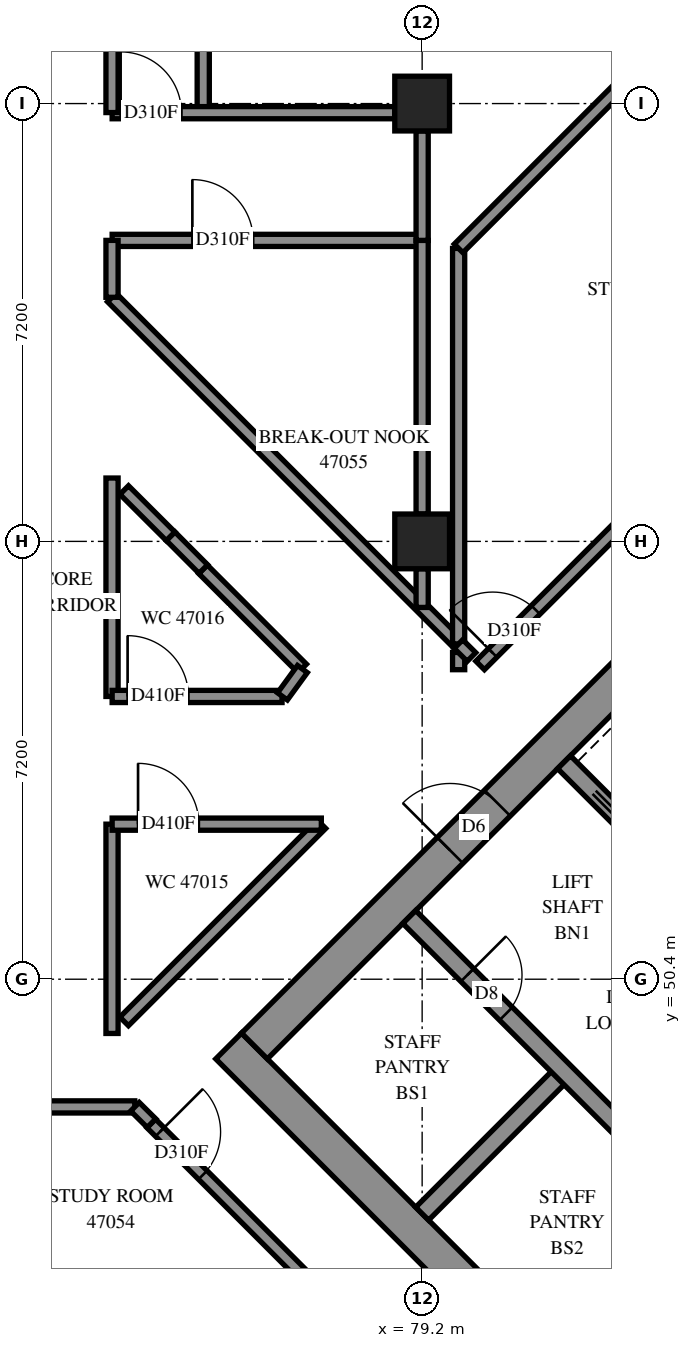
"""IFC4 building model, lengths in metres.
Left out: names, types, materials, properties, quantities, classifications, styles, units other than length and angle.
Written with IfcOpenShell. Run it as: python <this file> out.ifc"""

import sys

from ifc_helpers import new_model, si_unit, direction, frame, frame_2d, origin, origin_2d, place, context, subcontext, project, spatial, rectangle, extrude, element, fill, save


model = new_model("IFC4")
c1 = context("Model", 3, precision=1e-05, world=origin(), true_north=direction((0.0, 1.0)))
c2 = subcontext(c1, "Body", "Model", "MODEL_VIEW")
j1 = project(units=[si_unit("LENGTHUNIT", "METRE"), si_unit("PLANEANGLEUNIT", "RADIAN")], contexts=[c1])
p1 = place(None, origin())
s1 = spatial("IfcSite", under=j1, at=p1, CompositionType="ELEMENT")
p2 = place(p1, origin())
s2 = spatial("IfcBuilding", under=s1, at=p2, CompositionType="ELEMENT")
p3 = place(p2, frame((0.0, 0.0, 172.8)))
s3 = spatial("IfcBuildingStorey", under=s2, at=p3, CompositionType="ELEMENT", Elevation=172.8)
for number, where, z_axis, x_axis in (
    (1, (79.2, 57.6, 0.0), (0.0, 0.0, 1.0), (1.0, 0.0, 0.0)),
    (2, (79.2, 64.8, 0.0), (0.0, 0.0, 1.0), (1.0, 0.0, 0.0)),
):
    element("IfcColumn", number, at=place(p3, frame(where, z_axis=z_axis, x_axis=x_axis)), inside=s3, PredefinedType="COLUMN", context=c2, shape_type="SweptSolid", body=[
        extrude(rectangle(XDim=0.9, YDim=0.9, at=origin_2d()), origin(), (0.0, 0.0, 1.0), 3.1),
    ])
p4 = place(p3, frame((76.018, 49.302, -0.3), z_axis=(0.0, 0.0, 1.0), x_axis=(0.7071067812, -0.7071067812, 0.0)))
e3 = element("IfcWall", 3, at=p4, inside=s3, PredefinedType="SHEAR", context=c2, shape_type="SweptSolid", body=[
    extrude(rectangle(XDim=15.6, YDim=0.6, at=frame_2d((7.8, 0.0))), origin(), (0.0, 0.0, 1.0), 2.7),
])
p5 = place(p3, frame((76.442, 49.302, -0.3), z_axis=(0.0, 0.0, 1.0), x_axis=(0.7071067812, 0.7071067812, 0.0)))
e4 = element("IfcWall", 4, at=p5, inside=s3, PredefinedType="SHEAR", context=c2, shape_type="SweptSolid", body=[
    extrude(rectangle(XDim=14.4, YDim=0.6, at=frame_2d((7.2, 0.0))), origin(), (0.0, 0.0, 1.0), 2.7),
])
p6 = place(p5, frame((4.55, 0.0, 0.3)))
e5 = element("IfcOpeningElement", 5, at=p6, cuts=e4, PredefinedType="OPENING", context=c2, shape_type="SweptSolid", body=[
    extrude(rectangle(XDim=1.1, YDim=2.1, at=frame_2d((0.55, 1.05))), frame((0.0, 0.31, 0.0), z_axis=(0.0, -1.0, 0.0), x_axis=(1.0, 0.0, 0.0)), (0.0, 0.0, 1.0), 0.62),
])
p7 = place(p5, frame((11.35, 0.0, 0.3)))
e6 = element("IfcOpeningElement", 6, at=p7, cuts=e4, PredefinedType="OPENING", context=c2, shape_type="SweptSolid", body=[
    extrude(rectangle(XDim=1.1, YDim=2.1, at=frame_2d((0.55, 1.05))), frame((0.0, 0.31, 0.0), z_axis=(0.0, -1.0, 0.0), x_axis=(1.0, 0.0, 0.0)), (0.0, 0.0, 1.0), 0.62),
])
p8 = place(p3, frame((79.2, 46.544, 0.0), z_axis=(0.0, 0.0, 1.0), x_axis=(0.7071219326, 0.7070916295, 0.0)))
e7 = element("IfcWall", 7, at=p8, inside=s3, PredefinedType="SOLIDWALL", context=c2, shape_type="SweptSolid", body=[
    extrude(rectangle(XDim=3.3, YDim=0.3, at=frame_2d((1.65, 0.0))), origin(), (0.0, 0.0, 1.0), 3.1),
])
p9 = place(p3, frame((81.746, 43.999, 0.0), z_axis=(0.0, 0.0, 1.0), x_axis=(0.7071067812, 0.7071067812, 0.0)))
e8 = element("IfcWall", 8, at=p9, inside=s3, PredefinedType="SOLIDWALL", context=c2, shape_type="SweptSolid", body=[
    extrude(rectangle(XDim=3.3, YDim=0.3, at=frame_2d((1.65, 0.0))), origin(), (0.0, 0.0, 1.0), 3.1),
])
p10 = place(p3, frame((78.988, 51.423, 0.0), z_axis=(0.0, 0.0, 1.0), x_axis=(0.7071067812, -0.7071067812, 0.0)))
e9 = element("IfcWall", 9, at=p10, inside=s3, PredefinedType="SOLIDWALL", context=c2, shape_type="SweptSolid", body=[
    extrude(rectangle(XDim=14.4, YDim=0.3, at=frame_2d((7.2, 0.0))), origin(), (0.0, 0.0, 1.0), 3.1),
])
p11 = place(p10, frame((1.35, 0.0, 0.0)))
e10 = element("IfcOpeningElement", 10, at=p11, cuts=e9, PredefinedType="OPENING", context=c2, shape_type="SweptSolid", body=[
    extrude(rectangle(XDim=0.9, YDim=2.1, at=frame_2d((0.45, 1.05))), frame((0.0, 0.16, 0.0), z_axis=(0.0, -1.0, 0.0), x_axis=(1.0, 0.0, 0.0)), (0.0, 0.0, 1.0), 0.32),
])
p12 = place(p10, frame((4.95, 0.0, 0.0)))
e11 = element("IfcOpeningElement", 11, at=p12, cuts=e9, PredefinedType="OPENING", context=c2, shape_type="SweptSolid", body=[
    extrude(rectangle(XDim=0.9, YDim=2.1, at=frame_2d((0.45, 1.05))), frame((0.0, 0.16, 0.0), z_axis=(0.0, -1.0, 0.0), x_axis=(1.0, 0.0, 0.0)), (0.0, 0.0, 1.0), 0.32),
])
p13 = place(p10, frame((8.55, 0.0, 0.0)))
e12 = element("IfcOpeningElement", 12, at=p13, cuts=e9, PredefinedType="OPENING", context=c2, shape_type="SweptSolid", body=[
    extrude(rectangle(XDim=0.9, YDim=2.1, at=frame_2d((0.45, 1.05))), frame((0.0, 0.16, 0.0), z_axis=(0.0, -1.0, 0.0), x_axis=(1.0, 0.0, 0.0)), (0.0, 0.0, 1.0), 0.32),
])
p14 = place(p10, frame((12.05, 0.0, 0.0)))
e13 = element("IfcOpeningElement", 13, at=p14, cuts=e9, PredefinedType="OPENING", context=c2, shape_type="SweptSolid", body=[
    extrude(rectangle(XDim=1.1, YDim=2.1, at=frame_2d((0.55, 1.05))), frame((0.0, 0.16, 0.0), z_axis=(0.0, -1.0, 0.0), x_axis=(1.0, 0.0, 0.0)), (0.0, 0.0, 1.0), 0.32),
])
p15 = place(p3, frame((81.534, 53.969, 0.0), z_axis=(0.0, 0.0, 1.0), x_axis=(0.707103309, -0.7071102534, 0.0)))
e14 = element("IfcWall", 14, at=p15, inside=s3, PredefinedType="SOLIDWALL", context=c2, shape_type="SweptSolid", body=[
    extrude(rectangle(XDim=14.4, YDim=0.3, at=frame_2d((7.2, 0.0))), origin(), (0.0, 0.0, 1.0), 3.1),
])
p16 = place(p15, frame((1.25, 0.0, 0.0)))
e15 = element("IfcOpeningElement", 15, at=p16, cuts=e14, PredefinedType="OPENING", context=c2, shape_type="SweptSolid", body=[
    extrude(rectangle(XDim=1.1, YDim=2.1, at=frame_2d((0.55, 1.05))), frame((0.0, 0.16, 0.0), z_axis=(0.0, -1.0, 0.0), x_axis=(1.0, 0.0, 0.0)), (0.0, 0.0, 1.0), 0.32),
])
p17 = place(p15, frame((4.85, 0.0, 0.0)))
e16 = element("IfcOpeningElement", 16, at=p17, cuts=e14, PredefinedType="OPENING", context=c2, shape_type="SweptSolid", body=[
    extrude(rectangle(XDim=1.1, YDim=2.1, at=frame_2d((0.55, 1.05))), frame((0.0, 0.16, 0.0), z_axis=(0.0, -1.0, 0.0), x_axis=(1.0, 0.0, 0.0)), (0.0, 0.0, 1.0), 0.32),
])
p18 = place(p15, frame((8.45, 0.0, 0.0)))
e17 = element("IfcOpeningElement", 17, at=p18, cuts=e14, PredefinedType="OPENING", context=c2, shape_type="SweptSolid", body=[
    extrude(rectangle(XDim=1.1, YDim=2.1, at=frame_2d((0.55, 1.05))), frame((0.0, 0.16, 0.0), z_axis=(0.0, -1.0, 0.0), x_axis=(1.0, 0.0, 0.0)), (0.0, 0.0, 1.0), 0.32),
])
p19 = place(p15, frame((12.05, 0.0, 0.0)))
e18 = element("IfcOpeningElement", 18, at=p19, cuts=e14, PredefinedType="OPENING", context=c2, shape_type="SweptSolid", body=[
    extrude(rectangle(XDim=1.1, YDim=2.1, at=frame_2d((0.55, 1.05))), frame((0.0, 0.16, 0.0), z_axis=(0.0, -1.0, 0.0), x_axis=(1.0, 0.0, 0.0)), (0.0, 0.0, 1.0), 0.32),
])
p20 = place(p3, frame((55.5, 48.3, 0.0), z_axis=(0.0, 0.0, 1.0), x_axis=(1.0, 0.0, 0.0)))
e19 = element("IfcWall", 19, at=p20, inside=s3, PredefinedType="PARTITIONING", context=c2, shape_type="SweptSolid", body=[
    extrude(rectangle(XDim=18.974, YDim=0.2, at=frame_2d((9.487, 0.0))), origin(), (0.0, 0.0, 1.0), 3.1),
])
p21 = place(p20, frame((5.963, 0.0, 0.0)))
e20 = element("IfcOpeningElement", 20, at=p21, cuts=e19, PredefinedType="OPENING", context=c2, shape_type="SweptSolid", body=[
    extrude(rectangle(XDim=1.0, YDim=2.1, at=frame_2d((0.5, 1.05))), frame((0.0, 0.11, 0.0), z_axis=(0.0, -1.0, 0.0), x_axis=(1.0, 0.0, 0.0)), (0.0, 0.0, 1.0), 0.22),
])
p22 = place(p20, frame((13.161, 0.0, 0.0)))
e21 = element("IfcOpeningElement", 21, at=p22, cuts=e19, PredefinedType="OPENING", context=c2, shape_type="SweptSolid", body=[
    extrude(rectangle(XDim=0.9, YDim=2.1, at=frame_2d((0.45, 1.05))), frame((0.0, 0.11, 0.0), z_axis=(0.0, -1.0, 0.0), x_axis=(1.0, 0.0, 0.0)), (0.0, 0.0, 1.0), 0.22),
])
p23 = place(p3, frame((80.154, 55.56, 0.0), z_axis=(0.0, 0.0, 1.0), x_axis=(0.7071067812, 0.7071067812, 0.0)))
e22 = element("IfcWall", 22, at=p23, inside=s3, PredefinedType="PARTITIONING", context=c2, shape_type="SweptSolid", body=[
    extrude(rectangle(XDim=9.45, YDim=0.2, at=frame_2d((4.725, 0.0))), origin(), (0.0, 0.0, 1.0), 3.1),
])
p24 = place(p23, frame((0.292, 0.0, 0.0)))
e23 = element("IfcOpeningElement", 23, at=p24, cuts=e22, PredefinedType="OPENING", context=c2, shape_type="SweptSolid", body=[
    extrude(rectangle(XDim=1.0, YDim=2.1, at=frame_2d((0.5, 1.05))), frame((0.0, 0.11, 0.0), z_axis=(0.0, -1.0, 0.0), x_axis=(1.0, 0.0, 0.0)), (0.0, 0.0, 1.0), 0.22),
])
p25 = place(p3, frame((75.6, 64.65, 0.0), z_axis=(0.0, 0.0, 1.0), x_axis=(0.0, 1.0, 0.0)))
e24 = element("IfcWall", 24, at=p25, inside=s3, PredefinedType="PARTITIONING", context=c2, shape_type="SweptSolid", body=[
    extrude(rectangle(XDim=8.174, YDim=0.2, at=frame_2d((4.087, 0.0))), origin(), (0.0, 0.0, 1.0), 3.1),
])
p26 = place(p3, frame((74.097, 61.611, 0.0), z_axis=(0.0, 0.0, 1.0), x_axis=(0.7071067812, -0.7071067812, 0.0)))
e25 = element("IfcWall", 25, at=p26, inside=s3, PredefinedType="PARTITIONING", context=c2, shape_type="SweptSolid", body=[
    extrude(rectangle(XDim=8.061, YDim=0.2, at=frame_2d((4.03, 0.0))), origin(), (0.0, 0.0, 1.0), 3.1),
])
p27 = place(p3, frame((79.8, 55.914, 0.0), z_axis=(0.0, 0.0, 1.0), x_axis=(0.0, 1.0, 0.0)))
e26 = element("IfcWall", 26, at=p27, inside=s3, PredefinedType="PARTITIONING", context=c2, shape_type="SweptSolid", body=[
    extrude(rectangle(XDim=6.504, YDim=0.2, at=frame_2d((3.252, 0.0))), origin(), (0.0, 0.0, 1.0), 3.1),
])
p28 = place(p3, frame((79.799, 62.419, 0.0), z_axis=(0.0, 0.0, 1.0), x_axis=(0.7071067812, 0.7071067812, 0.0)))
e27 = element("IfcWall", 27, at=p28, inside=s3, PredefinedType="PARTITIONING", context=c2, shape_type="SweptSolid", body=[
    extrude(rectangle(XDim=5.716, YDim=0.2, at=frame_2d((2.858, 0.0))), origin(), (0.0, 0.0, 1.0), 3.1),
])
p29 = place(p3, frame((74.102, 62.55, 0.0), z_axis=(0.0, 0.0, 1.0), x_axis=(1.0, 0.0, 0.0)))
e28 = element("IfcWall", 28, at=p29, inside=s3, PredefinedType="PARTITIONING", context=c2, shape_type="SweptSolid", body=[
    extrude(rectangle(XDim=5.098, YDim=0.2, at=frame_2d((2.549, 0.0))), origin(), (0.0, 0.0, 1.0), 3.1),
])
p30 = place(p29, frame((1.319, 0.0, 0.0)))
e29 = element("IfcOpeningElement", 29, at=p30, cuts=e28, PredefinedType="OPENING", context=c2, shape_type="SweptSolid", body=[
    extrude(rectangle(XDim=1.0, YDim=2.1, at=frame_2d((0.5, 1.05))), frame((0.0, 0.11, 0.0), z_axis=(0.0, -1.0, 0.0), x_axis=(1.0, 0.0, 0.0)), (0.0, 0.0, 1.0), 0.22),
])
p31 = place(p3, frame((74.102, 64.65, 0.0), z_axis=(0.0, 0.0, 1.0), x_axis=(1.0, 0.0, 0.0)))
e30 = element("IfcWall", 30, at=p31, inside=s3, PredefinedType="PARTITIONING", context=c2, shape_type="SweptSolid", body=[
    extrude(rectangle(XDim=4.648, YDim=0.2, at=frame_2d((2.324, 0.0))), origin(), (0.0, 0.0, 1.0), 3.1),
])
p32 = place(p31, frame((0.14, 0.0, 0.0)))
e31 = element("IfcOpeningElement", 31, at=p32, cuts=e30, PredefinedType="OPENING", context=c2, shape_type="SweptSolid", body=[
    extrude(rectangle(XDim=1.0, YDim=2.1, at=frame_2d((0.5, 1.05))), frame((0.0, 0.11, 0.0), z_axis=(0.0, -1.0, 0.0), x_axis=(1.0, 0.0, 0.0)), (0.0, 0.0, 1.0), 0.22),
])
p33 = place(p3, frame((74.3, 49.706, 0.0), z_axis=(0.0, 0.0, 1.0), x_axis=(0.7071067812, 0.7071067812, 0.0)))
e32 = element("IfcWall", 32, at=p33, inside=s3, PredefinedType="PARTITIONING", context=c2, shape_type="SweptSolid", body=[
    extrude(rectangle(XDim=4.588, YDim=0.2, at=frame_2d((2.294, 0.0))), origin(), (0.0, 0.0, 1.0), 3.1),
])
p34 = place(p3, frame((79.2, 58.05, 0.0), z_axis=(0.0, 0.0, 1.0), x_axis=(0.0, 1.0, 0.0)))
e33 = element("IfcWall", 33, at=p34, inside=s3, PredefinedType="PARTITIONING", context=c2, shape_type="SweptSolid", body=[
    extrude(rectangle(XDim=4.5, YDim=0.2, at=frame_2d((2.25, 0.0))), origin(), (0.0, 0.0, 1.0), 3.1),
])
p35 = place(p3, frame((74.745, 48.029, 0.0), z_axis=(0.0, 0.0, 1.0), x_axis=(0.7068806156, -0.7073328745, 0.0)))
e34 = element("IfcWall", 34, at=p35, inside=s3, PredefinedType="PARTITIONING", context=c2, shape_type="SweptSolid", body=[
    extrude(rectangle(XDim=4.422, YDim=0.2, at=frame_2d((2.211, 0.0))), origin(), (0.0, 0.0, 1.0), 3.1),
])
p36 = place(p35, frame((0.199, 0.0, 0.0)))
e35 = element("IfcOpeningElement", 35, at=p36, cuts=e34, PredefinedType="OPENING", context=c2, shape_type="SweptSolid", body=[
    extrude(rectangle(XDim=1.0, YDim=2.1, at=frame_2d((0.5, 1.05))), frame((0.0, 0.11, 0.0), z_axis=(0.0, -1.0, 0.0), x_axis=(1.0, 0.0, 0.0)), (0.0, 0.0, 1.0), 0.22),
])
p37 = place(p3, frame((74.1, 55.05, 0.0), z_axis=(0.0, 0.0, 1.0), x_axis=(0.0, 1.0, 0.0)))
e36 = element("IfcWall", 36, at=p37, inside=s3, PredefinedType="PARTITIONING", context=c2, shape_type="SweptSolid", body=[
    extrude(rectangle(XDim=3.592, YDim=0.2, at=frame_2d((1.796, 0.0))), origin(), (0.0, 0.0, 1.0), 3.1),
])
p38 = place(p3, frame((74.1, 49.508, 0.0), z_axis=(0.0, 0.0, 1.0), x_axis=(0.0, 1.0, 0.0)))
e37 = element("IfcWall", 37, at=p38, inside=s3, PredefinedType="PARTITIONING", context=c2, shape_type="SweptSolid", body=[
    extrude(rectangle(XDim=3.442, YDim=0.2, at=frame_2d((1.721, 0.0))), origin(), (0.0, 0.0, 1.0), 3.1),
])
p39 = place(p3, frame((74.102, 52.95, 0.0), z_axis=(0.0, 0.0, 1.0), x_axis=(1.0, 0.0, 0.0)))
e38 = element("IfcWall", 38, at=p39, inside=s3, PredefinedType="PARTITIONING", context=c2, shape_type="SweptSolid", body=[
    extrude(rectangle(XDim=3.44, YDim=0.2, at=frame_2d((1.72, 0.0))), origin(), (0.0, 0.0, 1.0), 3.1),
])
p40 = place(p39, frame((0.426, 0.0, 0.0)))
e39 = element("IfcOpeningElement", 39, at=p40, cuts=e38, PredefinedType="OPENING", context=c2, shape_type="SweptSolid", body=[
    extrude(rectangle(XDim=1.0, YDim=2.1, at=frame_2d((0.5, 1.05))), frame((0.0, 0.11, 0.0), z_axis=(0.0, -1.0, 0.0), x_axis=(1.0, 0.0, 0.0)), (0.0, 0.0, 1.0), 0.22),
])
p41 = place(p3, frame((74.102, 55.05, 0.0), z_axis=(0.0, 0.0, 1.0), x_axis=(1.0, 0.0, 0.0)))
e40 = element("IfcWall", 40, at=p41, inside=s3, PredefinedType="PARTITIONING", context=c2, shape_type="SweptSolid", body=[
    extrude(rectangle(XDim=2.794, YDim=0.2, at=frame_2d((1.397, 0.0))), origin(), (0.0, 0.0, 1.0), 3.1),
])
p42 = place(p41, frame((0.254, 0.0, 0.0)))
e41 = element("IfcOpeningElement", 41, at=p42, cuts=e40, PredefinedType="OPENING", context=c2, shape_type="SweptSolid", body=[
    extrude(rectangle(XDim=1.0, YDim=2.1, at=frame_2d((0.5, 1.05))), frame((0.0, 0.11, 0.0), z_axis=(0.0, -1.0, 0.0), x_axis=(1.0, 0.0, 0.0)), (0.0, 0.0, 1.0), 0.22),
])
p43 = place(p3, frame((75.597, 57.141, 0.0), z_axis=(0.0, 0.0, 1.0), x_axis=(0.7071067812, -0.7071067812, 0.0)))
e42 = element("IfcWall", 42, at=p43, inside=s3, PredefinedType="PARTITIONING", context=c2, shape_type="SweptSolid", body=[
    extrude(rectangle(XDim=2.305, YDim=0.2, at=frame_2d((1.153, 0.0))), origin(), (0.0, 0.0, 1.0), 3.1),
])
p44 = place(p3, frame((74.1, 64.652, 0.0), z_axis=(0.0, 0.0, 1.0), x_axis=(0.0, 1.0, 0.0)))
e43 = element("IfcWall", 43, at=p44, inside=s3, PredefinedType="PARTITIONING", context=c2, shape_type="SweptSolid", body=[
    extrude(rectangle(XDim=2.248, YDim=0.2, at=frame_2d((1.124, 0.0))), origin(), (0.0, 0.0, 1.0), 3.1),
])
p45 = place(p3, frame((79.2, 62.55, 0.0), z_axis=(0.0, 0.0, 1.0), x_axis=(0.0, 1.0, 0.0)))
e44 = element("IfcWall", 44, at=p45, inside=s3, PredefinedType="PARTITIONING", context=c2, shape_type="SweptSolid", body=[
    extrude(rectangle(XDim=1.8, YDim=0.2, at=frame_2d((0.9, 0.0))), origin(), (0.0, 0.0, 1.0), 3.1),
])
p46 = place(p3, frame((74.3, 58.444, 0.0), z_axis=(0.0, 0.0, 1.0), x_axis=(0.7080329185, -0.7061794292, 0.0)))
e45 = element("IfcWall", 45, at=p46, inside=s3, PredefinedType="PARTITIONING", context=c2, shape_type="SweptSolid", body=[
    extrude(rectangle(XDim=1.079, YDim=0.2, at=frame_2d((0.539, 0.0))), origin(), (0.0, 0.0, 1.0), 3.1),
])
p47 = place(p3, frame((74.1, 61.614, 0.0), z_axis=(0.0, 0.0, 1.0), x_axis=(0.0, 1.0, 0.0)))
e46 = element("IfcWall", 46, at=p47, inside=s3, PredefinedType="PARTITIONING", context=c2, shape_type="SweptSolid", body=[
    extrude(rectangle(XDim=0.936, YDim=0.2, at=frame_2d((0.468, 0.0))), origin(), (0.0, 0.0, 1.0), 3.1),
])
p48 = place(p3, frame((75.065, 57.683, 0.0), z_axis=(0.0, 0.0, 1.0), x_axis=(0.705788785, -0.7084223253, 0.0)))
e47 = element("IfcWall", 47, at=p48, inside=s3, PredefinedType="PARTITIONING", context=c2, shape_type="SweptSolid", body=[
    extrude(rectangle(XDim=0.759, YDim=0.2, at=frame_2d((0.38, 0.0))), origin(), (0.0, 0.0, 1.0), 3.1),
])
p49 = place(p3, frame((79.2, 56.514, 0.0), z_axis=(0.0, 0.0, 1.0), x_axis=(0.0, 1.0, 0.0)))
e48 = element("IfcWall", 48, at=p49, inside=s3, PredefinedType="PARTITIONING", context=c2, shape_type="SweptSolid", body=[
    extrude(rectangle(XDim=0.636, YDim=0.2, at=frame_2d((0.318, 0.0))), origin(), (0.0, 0.0, 1.0), 3.1),
])
p50 = place(p3, frame((76.903, 55.051, 0.0), z_axis=(0.0, 0.0, 1.0), x_axis=(0.5890255926, 0.8081143801, 0.0)))
e49 = element("IfcWall", 49, at=p50, inside=s3, PredefinedType="PARTITIONING", context=c2, shape_type="SweptSolid", body=[
    extrude(rectangle(XDim=0.557, YDim=0.2, at=frame_2d((0.278, 0.0))), origin(), (0.0, 0.0, 1.0), 3.1),
])
p51 = place(p3, frame((79.8, 55.49, 0.0), z_axis=(0.0, 0.0, 1.0), x_axis=(0.0, 1.0, 0.0)))
e50 = element("IfcWall", 50, at=p51, inside=s3, PredefinedType="PARTITIONING", context=c2, shape_type="SweptSolid", body=[
    extrude(rectangle(XDim=0.284, YDim=0.2, at=frame_2d((0.142, 0.0))), origin(), (0.0, 0.0, 1.0), 3.1),
])
p52 = place(p3, frame((74.477, 48.303, 0.0), z_axis=(0.0, 0.0, 1.0), x_axis=(0.7097111995, -0.7044927348, 0.0)))
e51 = element("IfcWall", 51, at=p52, inside=s3, PredefinedType="PARTITIONING", context=c2, shape_type="SweptSolid", body=[
    extrude(rectangle(XDim=0.383, YDim=0.2, at=frame_2d((0.192, 0.0))), origin(), (0.0, 0.0, 1.0), 3.1),
])
p53 = place(p3, frame((79.797, 55.911, 0.0), z_axis=(0.0, 0.0, 1.0), x_axis=(0.710418702, -0.7037792749, 0.0)))
e52 = element("IfcWall", 52, at=p53, inside=s3, PredefinedType="PARTITIONING", context=c2, shape_type="SweptSolid", body=[
    extrude(rectangle(XDim=0.301, YDim=0.2, at=frame_2d((0.151, 0.0))), origin(), (0.0, 0.0, 1.0), 3.1),
])
p54 = place(p6, origin())
e53 = element("IfcDoor", 53, at=p54, inside=s3, OperationType="DOUBLE_DOOR_SINGLE_SWING", PredefinedType="DOOR", context=c2, shape_type="SweptSolid", body=[
    extrude(rectangle(XDim=1.1, YDim=2.1, at=frame_2d((0.55, 1.05))), frame((0.0, 0.025, 0.0), z_axis=(0.0, -1.0, 0.0), x_axis=(1.0, 0.0, 0.0)), (0.0, 0.0, 1.0), 0.05),
])
fill(e5, e53)
p55 = place(p11, origin())
e54 = element("IfcDoor", 54, at=p55, inside=s3, OperationType="SINGLE_SWING_LEFT", PredefinedType="DOOR", context=c2, shape_type="SweptSolid", body=[
    extrude(rectangle(XDim=0.9, YDim=2.1, at=frame_2d((0.45, 1.05))), frame((0.0, 0.025, 0.0), z_axis=(0.0, -1.0, 0.0), x_axis=(1.0, 0.0, 0.0)), (0.0, 0.0, 1.0), 0.05),
])
fill(e10, e54)
p56 = place(p40, origin())
e55 = element("IfcDoor", 55, at=p56, inside=s3, OperationType="SINGLE_SWING_RIGHT", PredefinedType="DOOR", context=c2, shape_type="SweptSolid", body=[
    extrude(rectangle(XDim=1.0, YDim=2.1, at=frame_2d((0.5, 1.05))), frame((0.0, 0.025, 0.0), z_axis=(0.0, -1.0, 0.0), x_axis=(1.0, 0.0, 0.0)), (0.0, 0.0, 1.0), 0.05),
])
fill(e39, e55)
p57 = place(p42, origin())
e56 = element("IfcDoor", 56, at=p57, inside=s3, OperationType="SINGLE_SWING_LEFT", PredefinedType="DOOR", context=c2, shape_type="SweptSolid", body=[
    extrude(rectangle(XDim=1.0, YDim=2.1, at=frame_2d((0.5, 1.05))), frame((0.0, 0.025, 0.0), z_axis=(0.0, -1.0, 0.0), x_axis=(1.0, 0.0, 0.0)), (0.0, 0.0, 1.0), 0.05),
])
fill(e41, e56)
p58 = place(p32, origin())
e57 = element("IfcDoor", 57, at=p58, inside=s3, OperationType="SINGLE_SWING_RIGHT", PredefinedType="DOOR", context=c2, shape_type="SweptSolid", body=[
    extrude(rectangle(XDim=1.0, YDim=2.1, at=frame_2d((0.5, 1.05))), frame((0.0, 0.025, 0.0), z_axis=(0.0, -1.0, 0.0), x_axis=(1.0, 0.0, 0.0)), (0.0, 0.0, 1.0), 0.05),
])
fill(e31, e57)
p59 = place(p36, origin())
e58 = element("IfcDoor", 58, at=p59, inside=s3, OperationType="SINGLE_SWING_LEFT", PredefinedType="DOOR", context=c2, shape_type="SweptSolid", body=[
    extrude(rectangle(XDim=1.0, YDim=2.1, at=frame_2d((0.5, 1.05))), frame((0.0, 0.025, 0.0), z_axis=(0.0, -1.0, 0.0), x_axis=(1.0, 0.0, 0.0)), (0.0, 0.0, 1.0), 0.05),
])
fill(e35, e58)
p60 = place(p30, origin())
e59 = element("IfcDoor", 59, at=p60, inside=s3, OperationType="SINGLE_SWING_RIGHT", PredefinedType="DOOR", context=c2, shape_type="SweptSolid", body=[
    extrude(rectangle(XDim=1.0, YDim=2.1, at=frame_2d((0.5, 1.05))), frame((0.0, 0.025, 0.0), z_axis=(0.0, -1.0, 0.0), x_axis=(1.0, 0.0, 0.0)), (0.0, 0.0, 1.0), 0.05),
])
fill(e29, e59)
p61 = place(p24, origin())
e60 = element("IfcDoor", 60, at=p61, inside=s3, OperationType="SINGLE_SWING_LEFT", PredefinedType="DOOR", context=c2, shape_type="SweptSolid", body=[
    extrude(rectangle(XDim=1.0, YDim=2.1, at=frame_2d((0.5, 1.05))), frame((0.0, 0.025, 0.0), z_axis=(0.0, -1.0, 0.0), x_axis=(1.0, 0.0, 0.0)), (0.0, 0.0, 1.0), 0.05),
])
fill(e23, e60)
save(model, sys.argv[1])
